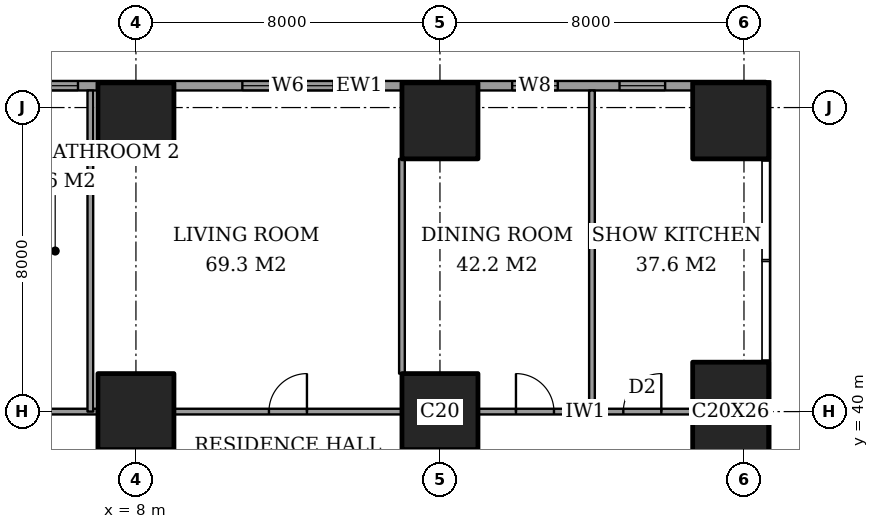
"""IFC4 building model, lengths in metres.
Left out: names, types, materials, properties, quantities, classifications, styles, units other than length and angle.
Written with IfcOpenShell. Run it as: python <this file> out.ifc"""

import sys

from ifc_helpers import new_model, si_unit, direction, frame, frame_2d, origin, origin_2d, place, context, subcontext, project, spatial, rectangle, extrude, element, fill, save


model = new_model("IFC4")
c1 = context("Model", 3, precision=1e-05, world=origin(), true_north=direction((0.0, 1.0)))
c2 = subcontext(c1, "Body", "Model", "MODEL_VIEW")
j1 = project(units=[si_unit("LENGTHUNIT", "METRE"), si_unit("PLANEANGLEUNIT", "RADIAN")], contexts=[c1])
p1 = place(None, origin())
s1 = spatial("IfcSite", under=j1, at=p1, CompositionType="ELEMENT")
p2 = place(p1, origin())
s2 = spatial("IfcBuilding", under=s1, at=p2, CompositionType="ELEMENT")
p3 = place(p2, frame((0.0, 0.0, 58.4)))
s3 = spatial("IfcBuildingStorey", under=s2, at=p3, CompositionType="ELEMENT", Elevation=58.4)
for number, where, z_axis, x_axis in (
    (1, (8.0, 40.0, 0.0), (0.0, 0.0, 1.0), (1.0, 0.0, 0.0)),
    (2, (8.0, 47.65, 0.0), (0.0, 0.0, 1.0), (1.0, 0.0, 0.0)),
    (3, (16.0, 40.0, 0.0), (0.0, 0.0, 1.0), (1.0, 0.0, 0.0)),
    (4, (16.0, 47.65, 0.0), (0.0, 0.0, 1.0), (1.0, 0.0, 0.0)),
):
    element("IfcColumn", number, at=place(p3, frame(where, z_axis=z_axis, x_axis=x_axis)), inside=s3, PredefinedType="COLUMN", context=c2, shape_type="SweptSolid", body=[
        extrude(rectangle(XDim=2.0, YDim=2.0, at=origin_2d()), origin(), (0.0, 0.0, 1.0), 3.6),
    ])
p4 = place(p3, frame((23.65, 40.0, 0.0), z_axis=(0.0, 0.0, 1.0), x_axis=(1.0, 0.0, 0.0)))
e5 = element("IfcColumn", 5, at=p4, inside=s3, PredefinedType="COLUMN", context=c2, shape_type="SweptSolid", body=[
    extrude(rectangle(XDim=2.0, YDim=2.6, at=origin_2d()), origin(), (0.0, 0.0, 1.0), 3.6),
])
p5 = place(p3, frame((23.65, 47.65, 0.0), z_axis=(0.0, 0.0, 1.0), x_axis=(1.0, 0.0, 0.0)))
e6 = element("IfcColumn", 6, at=p5, inside=s3, PredefinedType="COLUMN", context=c2, shape_type="SweptSolid", body=[
    extrude(rectangle(XDim=2.0, YDim=2.0, at=origin_2d()), origin(), (0.0, 0.0, 1.0), 3.6),
])
p6 = place(p3, frame((24.575, 48.575, 0.0), z_axis=(0.0, 0.0, 1.0), x_axis=(-1.0, 0.0, 0.0)))
e7 = element("IfcWall", 7, at=p6, inside=s3, PredefinedType="SOLIDWALL", context=c2, shape_type="SweptSolid", body=[
    extrude(rectangle(XDim=21.4, YDim=0.25, at=frame_2d((10.7, 0.0))), origin(), (0.0, 0.0, 1.0), 3.6),
])
p7 = place(p6, frame((2.65, 0.0, 0.6)))
e8 = element("IfcOpeningElement", 8, at=p7, cuts=e7, PredefinedType="OPENING", context=c2, shape_type="SweptSolid", body=[
    extrude(rectangle(XDim=1.2, YDim=2.0, at=frame_2d((0.6, 1.0))), frame((0.0, 0.135, 0.0), z_axis=(0.0, -1.0, 0.0), x_axis=(1.0, 0.0, 0.0)), (0.0, 0.0, 1.0), 0.27),
])
p8 = place(p6, frame((5.475, 0.0, 0.6)))
e9 = element("IfcOpeningElement", 9, at=p8, cuts=e7, PredefinedType="OPENING", context=c2, shape_type="SweptSolid", body=[
    extrude(rectangle(XDim=1.2, YDim=2.0, at=frame_2d((0.6, 1.0))), frame((0.0, 0.135, 0.0), z_axis=(0.0, -1.0, 0.0), x_axis=(1.0, 0.0, 0.0)), (0.0, 0.0, 1.0), 0.27),
])
p9 = place(p6, frame((11.375, 0.0, 0.6)))
e10 = element("IfcOpeningElement", 10, at=p9, cuts=e7, PredefinedType="OPENING", context=c2, shape_type="SweptSolid", body=[
    extrude(rectangle(XDim=2.4, YDim=2.0, at=frame_2d((1.2, 1.0))), frame((0.0, 0.135, 0.0), z_axis=(0.0, -1.0, 0.0), x_axis=(1.0, 0.0, 0.0)), (0.0, 0.0, 1.0), 0.27),
])
p10 = place(p6, frame((18.1, 0.0, 0.6)))
e11 = element("IfcOpeningElement", 11, at=p10, cuts=e7, PredefinedType="OPENING", context=c2, shape_type="SweptSolid", body=[
    extrude(rectangle(XDim=1.2, YDim=2.0, at=frame_2d((0.6, 1.0))), frame((0.0, 0.135, 0.0), z_axis=(0.0, -1.0, 0.0), x_axis=(1.0, 0.0, 0.0)), (0.0, 0.0, 1.0), 0.27),
])
p11 = place(p6, frame((19.925, 0.0, 0.6)))
e12 = element("IfcOpeningElement", 12, at=p11, cuts=e7, PredefinedType="OPENING", context=c2, shape_type="SweptSolid", body=[
    extrude(rectangle(XDim=1.2, YDim=2.0, at=frame_2d((0.6, 1.0))), frame((0.0, 0.135, 0.0), z_axis=(0.0, -1.0, 0.0), x_axis=(1.0, 0.0, 0.0)), (0.0, 0.0, 1.0), 0.27),
])
p12 = place(p3, frame((1.35, 40.0, 0.0), z_axis=(0.0, 0.0, 1.0), x_axis=(1.0, 0.0, 0.0)))
e13 = element("IfcWall", 13, at=p12, inside=s3, PredefinedType="PARTITIONING", context=c2, shape_type="SweptSolid", body=[
    extrude(rectangle(XDim=5.65, YDim=0.15, at=frame_2d((2.825, 0.0))), origin(), (0.0, 0.0, 1.0), 3.35),
])
p13 = place(p12, frame((1.3, 0.0, 0.0)))
e14 = element("IfcOpeningElement", 14, at=p13, cuts=e13, PredefinedType="OPENING", context=c2, shape_type="SweptSolid", body=[
    extrude(rectangle(XDim=1.0, YDim=2.1, at=frame_2d((0.5, 1.05))), frame((0.0, 0.085, 0.0), z_axis=(0.0, -1.0, 0.0), x_axis=(1.0, 0.0, 0.0)), (0.0, 0.0, 1.0), 0.17),
])
p14 = place(p3, frame((9.0, 40.0, 0.0), z_axis=(0.0, 0.0, 1.0), x_axis=(1.0, 0.0, 0.0)))
e15 = element("IfcWall", 15, at=p14, inside=s3, PredefinedType="PARTITIONING", context=c2, shape_type="SweptSolid", body=[
    extrude(rectangle(XDim=6.0, YDim=0.15, at=frame_2d((3.0, 0.0))), origin(), (0.0, 0.0, 1.0), 3.35),
])
p15 = place(p14, frame((2.5, 0.0, 0.0)))
e16 = element("IfcOpeningElement", 16, at=p15, cuts=e15, PredefinedType="OPENING", context=c2, shape_type="SweptSolid", body=[
    extrude(rectangle(XDim=1.0, YDim=2.1, at=frame_2d((0.5, 1.05))), frame((0.0, 0.085, 0.0), z_axis=(0.0, -1.0, 0.0), x_axis=(1.0, 0.0, 0.0)), (0.0, 0.0, 1.0), 0.17),
])
p16 = place(p3, frame((17.0, 40.0, 0.0), z_axis=(0.0, 0.0, 1.0), x_axis=(1.0, 0.0, 0.0)))
e17 = element("IfcWall", 17, at=p16, inside=s3, PredefinedType="PARTITIONING", context=c2, shape_type="SweptSolid", body=[
    extrude(rectangle(XDim=5.65, YDim=0.15, at=frame_2d((2.825, 0.0))), origin(), (0.0, 0.0, 1.0), 3.35),
])
p17 = place(p16, frame((1.0, 0.0, 0.0)))
e18 = element("IfcOpeningElement", 18, at=p17, cuts=e17, PredefinedType="OPENING", context=c2, shape_type="SweptSolid", body=[
    extrude(rectangle(XDim=1.0, YDim=2.1, at=frame_2d((0.5, 1.05))), frame((0.0, 0.085, 0.0), z_axis=(0.0, -1.0, 0.0), x_axis=(1.0, 0.0, 0.0)), (0.0, 0.0, 1.0), 0.17),
])
p18 = place(p16, frame((3.825, 0.0, 0.0)))
e19 = element("IfcOpeningElement", 19, at=p18, cuts=e17, PredefinedType="OPENING", context=c2, shape_type="SweptSolid", body=[
    extrude(rectangle(XDim=1.0, YDim=2.1, at=frame_2d((0.5, 1.05))), frame((0.0, 0.085, 0.0), z_axis=(0.0, -1.0, 0.0), x_axis=(1.0, 0.0, 0.0)), (0.0, 0.0, 1.0), 0.17),
])
p19 = place(p3, frame((6.8, 40.0, 0.0), z_axis=(0.0, 0.0, 1.0), x_axis=(0.0, 1.0, 0.0)))
e20 = element("IfcWall", 20, at=p19, inside=s3, PredefinedType="PARTITIONING", context=c2, shape_type="SweptSolid", body=[
    extrude(rectangle(XDim=8.45, YDim=0.15, at=frame_2d((4.225, 0.0))), origin(), (0.0, 0.0, 1.0), 3.35),
])
p20 = place(p3, frame((15.0, 41.0, 0.0), z_axis=(0.0, 0.0, 1.0), x_axis=(0.0, 1.0, 0.0)))
e21 = element("IfcWall", 21, at=p20, inside=s3, PredefinedType="PARTITIONING", context=c2, shape_type="SweptSolid", body=[
    extrude(rectangle(XDim=5.65, YDim=0.15, at=frame_2d((2.825, 0.0))), origin(), (0.0, 0.0, 1.0), 3.35),
])
p21 = place(p3, frame((20.0, 40.0, 0.0), z_axis=(0.0, 0.0, 1.0), x_axis=(0.0, 1.0, 0.0)))
e22 = element("IfcWall", 22, at=p21, inside=s3, PredefinedType="PARTITIONING", context=c2, shape_type="SweptSolid", body=[
    extrude(rectangle(XDim=8.45, YDim=0.15, at=frame_2d((4.225, 0.0))), origin(), (0.0, 0.0, 1.0), 3.35),
])
p22 = place(p7, origin())
e23 = element("IfcWindow", 23, at=p22, inside=s3, PartitioningType="SINGLE_PANEL", PredefinedType="WINDOW", context=c2, shape_type="SweptSolid", body=[
    extrude(rectangle(XDim=1.2, YDim=2.0, at=frame_2d((0.6, 1.0))), frame((0.0, 0.03, 0.0), z_axis=(0.0, -1.0, 0.0), x_axis=(1.0, 0.0, 0.0)), (0.0, 0.0, 1.0), 0.06),
])
fill(e8, e23)
p23 = place(p8, origin())
e24 = element("IfcWindow", 24, at=p23, inside=s3, PartitioningType="SINGLE_PANEL", PredefinedType="WINDOW", context=c2, shape_type="SweptSolid", body=[
    extrude(rectangle(XDim=1.2, YDim=2.0, at=frame_2d((0.6, 1.0))), frame((0.0, 0.03, 0.0), z_axis=(0.0, -1.0, 0.0), x_axis=(1.0, 0.0, 0.0)), (0.0, 0.0, 1.0), 0.06),
])
fill(e9, e24)
p24 = place(p9, origin())
e25 = element("IfcWindow", 25, at=p24, inside=s3, PartitioningType="SINGLE_PANEL", PredefinedType="WINDOW", context=c2, shape_type="SweptSolid", body=[
    extrude(rectangle(XDim=2.4, YDim=2.0, at=frame_2d((1.2, 1.0))), frame((0.0, 0.03, 0.0), z_axis=(0.0, -1.0, 0.0), x_axis=(1.0, 0.0, 0.0)), (0.0, 0.0, 1.0), 0.06),
])
fill(e10, e25)
p25 = place(p10, origin())
e26 = element("IfcWindow", 26, at=p25, inside=s3, PartitioningType="SINGLE_PANEL", PredefinedType="WINDOW", context=c2, shape_type="SweptSolid", body=[
    extrude(rectangle(XDim=1.2, YDim=2.0, at=frame_2d((0.6, 1.0))), frame((0.0, 0.03, 0.0), z_axis=(0.0, -1.0, 0.0), x_axis=(1.0, 0.0, 0.0)), (0.0, 0.0, 1.0), 0.06),
])
fill(e11, e26)
p26 = place(p15, origin())
e27 = element("IfcDoor", 27, at=p26, inside=s3, OperationType="SINGLE_SWING_LEFT", PredefinedType="DOOR", context=c2, shape_type="SweptSolid", body=[
    extrude(rectangle(XDim=1.0, YDim=2.1, at=frame_2d((0.5, 1.05))), frame((0.0, 0.025, 0.0), z_axis=(0.0, -1.0, 0.0), x_axis=(1.0, 0.0, 0.0)), (0.0, 0.0, 1.0), 0.05),
])
fill(e16, e27)
p27 = place(p17, origin())
e28 = element("IfcDoor", 28, at=p27, inside=s3, OperationType="SINGLE_SWING_RIGHT", PredefinedType="DOOR", context=c2, shape_type="SweptSolid", body=[
    extrude(rectangle(XDim=1.0, YDim=2.1, at=frame_2d((0.5, 1.05))), frame((0.0, 0.025, 0.0), z_axis=(0.0, -1.0, 0.0), x_axis=(1.0, 0.0, 0.0)), (0.0, 0.0, 1.0), 0.05),
])
fill(e18, e28)
p28 = place(p18, origin())
e29 = element("IfcDoor", 29, at=p28, inside=s3, OperationType="SINGLE_SWING_LEFT", PredefinedType="DOOR", context=c2, shape_type="SweptSolid", body=[
    extrude(rectangle(XDim=1.0, YDim=2.1, at=frame_2d((0.5, 1.05))), frame((0.0, 0.025, 0.0), z_axis=(0.0, -1.0, 0.0), x_axis=(1.0, 0.0, 0.0)), (0.0, 0.0, 1.0), 0.05),
])
fill(e19, e29)
save(model, sys.argv[1])
